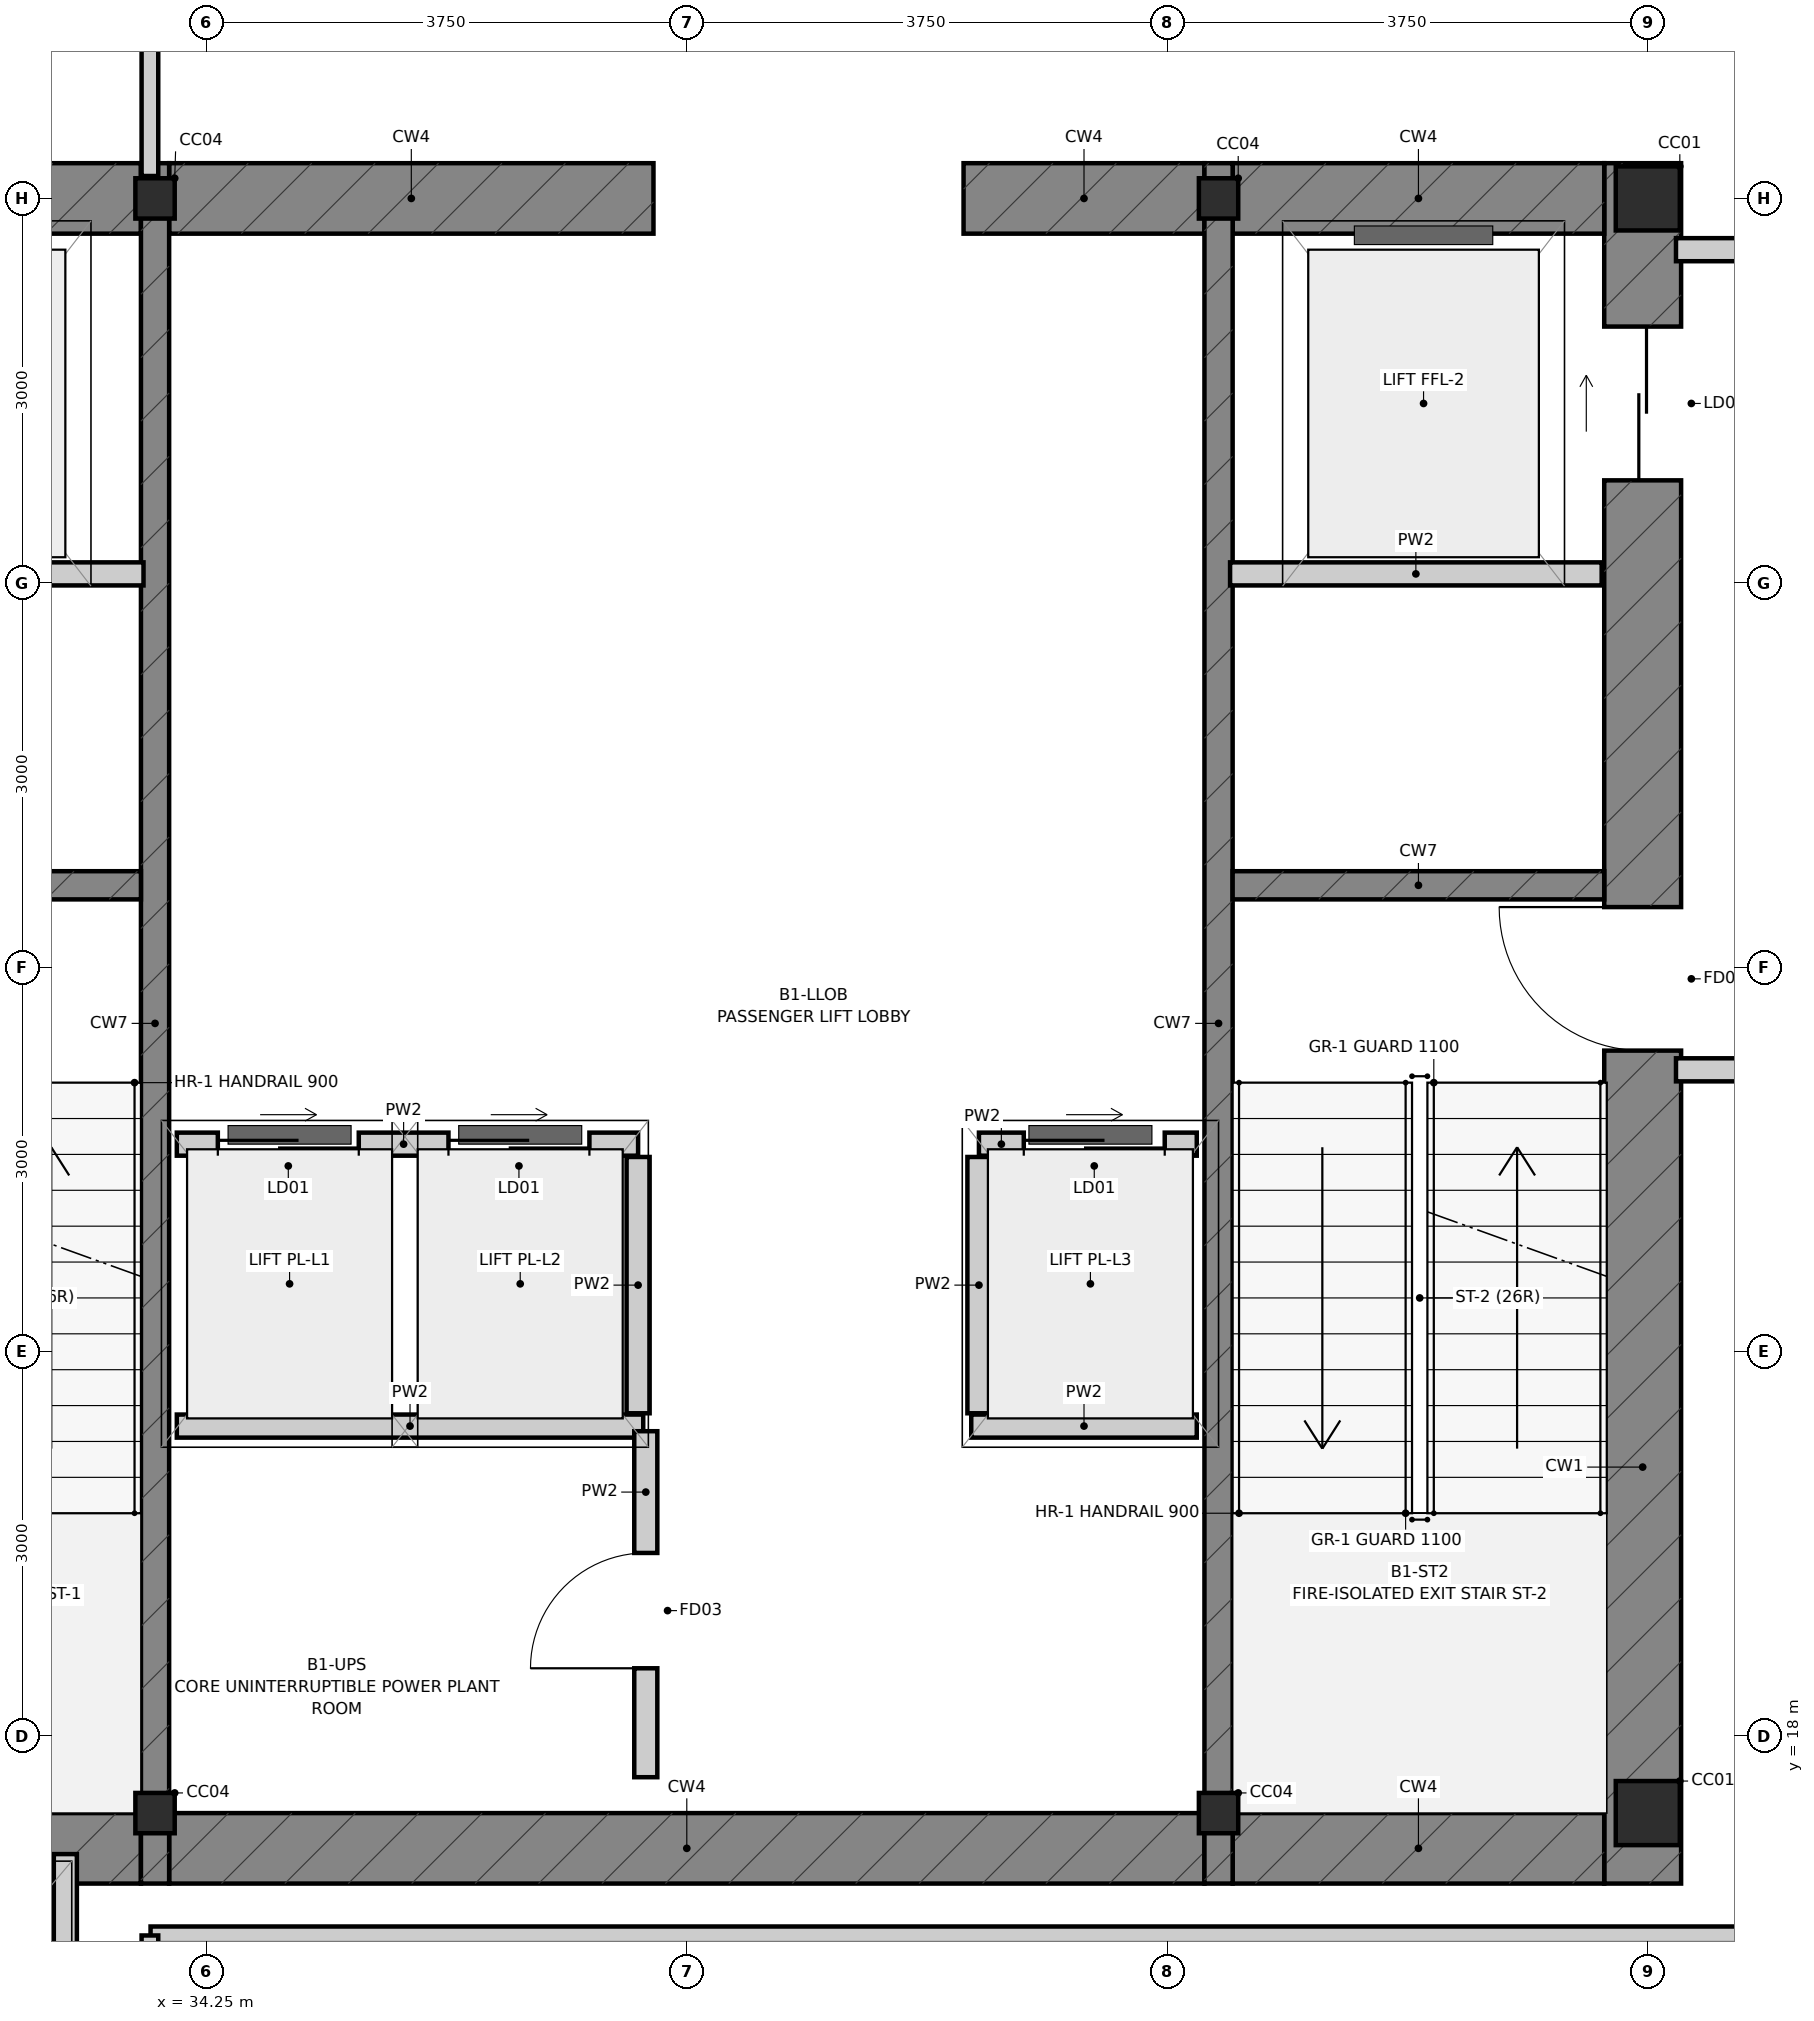
"""IFC4 building model, lengths in metres.
Left out: names, types, materials, properties, quantities, classifications, styles, units other than length and angle.
Written with IfcOpenShell. Run it as: python <this file> out.ifc"""

import sys

from ifc_helpers import new_model, si_unit, direction, frame, frame_2d, origin, origin_2d, place, context, subcontext, project, spatial, rectangle, i_section, extrude, source, transform, mapped, element, fill, save


model = new_model("IFC4")
c1 = context("Model", 3, precision=1e-05, world=origin(), true_north=direction((0.0, 1.0)))
c2 = subcontext(c1, "Body", "Model", "MODEL_VIEW")
j1 = project(units=[si_unit("LENGTHUNIT", "METRE"), si_unit("PLANEANGLEUNIT", "RADIAN")], contexts=[c1])
p1 = place(None, origin())
s1 = spatial("IfcSite", under=j1, at=p1, CompositionType="ELEMENT")
p2 = place(p1, origin())
s2 = spatial("IfcBuilding", under=s1, at=p2, CompositionType="ELEMENT")
p3 = place(p2, frame((0.0, 0.0, -4.8)))
s3 = spatial("IfcBuildingStorey", under=s2, at=p3, CompositionType="ELEMENT", Elevation=-4.8)
m1 = source(origin(), c2, "Body", "SweptSolid", [
    extrude(i_section(OverallWidth=0.5, OverallDepth=0.5, WebThickness=0.028, FlangeThickness=0.04, at=origin_2d()), origin(), (0.0, 0.0, 1.0), 4.8),
])
for number, where, z_axis, x_axis in (
    (1, (45.5, 17.4, 0.0), (0.0, 0.0, 1.0), (1.0, 0.0, 0.0)),
    (2, (45.5, 30.0, 0.0), (0.0, 0.0, 1.0), (1.0, 0.0, 0.0)),
):
    element("IfcColumn", number, at=place(p3, frame(where, z_axis=z_axis, x_axis=x_axis)), inside=s3, PredefinedType="COLUMN", context=c2, shape_type="MappedRepresentation", body=[
        mapped(m1, transform((0.0, 0.0, 0.0), scale=1.0)),
    ])
m2 = source(origin(), c2, "Body", "SweptSolid", [
    extrude(i_section(OverallWidth=0.307, OverallDepth=0.315, WebThickness=0.012, FlangeThickness=0.019, at=origin_2d()), origin(), (0.0, 0.0, 1.0), 4.8),
])
for number, where, z_axis, x_axis in (
    (3, (33.85, 17.4, 0.0), (0.0, 0.0, 1.0), (1.0, 0.0, 0.0)),
    (4, (42.15, 17.4, 0.0), (0.0, 0.0, 1.0), (1.0, 0.0, 0.0)),
    (5, (33.85, 30.0, 0.0), (0.0, 0.0, 1.0), (1.0, 0.0, 0.0)),
    (6, (42.15, 30.0, 0.0), (0.0, 0.0, 1.0), (1.0, 0.0, 0.0)),
):
    element("IfcColumn", number, at=place(p3, frame(where, z_axis=z_axis, x_axis=x_axis)), inside=s3, PredefinedType="COLUMN", context=c2, shape_type="MappedRepresentation", body=[
        mapped(m2, transform((0.0, 0.0, 0.0), scale=1.0)),
    ])
p4 = place(p3, frame((45.46, 16.85, 0.0), z_axis=(0.0, 0.0, 1.0), x_axis=(0.0, 1.0, 0.0)))
e7 = element("IfcWall", 7, at=p4, inside=s3, PredefinedType="SHEAR", context=c2, shape_type="SweptSolid", body=[
    extrude(rectangle(XDim=13.425, YDim=0.6, at=frame_2d((6.712, 0.0))), origin(), (0.0, 0.0, 1.0), 4.8),
])
p5 = place(p4, frame((6.5, 0.0, 0.0)))
e8 = element("IfcOpeningElement", 8, at=p5, cuts=e7, PredefinedType="OPENING", context=c2, shape_type="SweptSolid", body=[
    extrude(rectangle(XDim=1.12, YDim=2.15, at=frame_2d((0.56, 1.075))), frame((0.0, 0.312, 0.0), z_axis=(0.0, -1.0, 0.0), x_axis=(1.0, 0.0, 0.0)), (0.0, 0.0, 1.0), 0.624),
])
p6 = place(p4, frame((10.95, 0.0, 0.0)))
e9 = element("IfcOpeningElement", 9, at=p6, cuts=e7, PredefinedType="OPENING", context=c2, shape_type="SweptSolid", body=[
    extrude(rectangle(XDim=1.2, YDim=2.2, at=frame_2d((0.6, 1.1))), frame((0.0, 0.312, 0.0), z_axis=(0.0, -1.0, 0.0), x_axis=(1.0, 0.0, 0.0)), (0.0, 0.0, 1.0), 0.624),
])
p7 = place(p3, frame((30.84, 17.125, 0.0), z_axis=(0.0, 0.0, 1.0), x_axis=(1.0, 0.0, 0.0)))
e10 = element("IfcWall", 10, at=p7, inside=s3, PredefinedType="SHEAR", context=c2, shape_type="SweptSolid", body=[
    extrude(rectangle(XDim=2.9, YDim=0.55, at=frame_2d((1.45, 0.0))), origin(), (0.0, 0.0, 1.0), 4.8),
])
p8 = place(p3, frame((33.96, 17.125, 0.0), z_axis=(0.0, 0.0, 1.0), x_axis=(1.0, 0.0, 0.0)))
e11 = element("IfcWall", 11, at=p8, inside=s3, PredefinedType="SHEAR", context=c2, shape_type="SweptSolid", body=[
    extrude(rectangle(XDim=8.08, YDim=0.55, at=frame_2d((4.04, 0.0))), origin(), (0.0, 0.0, 1.0), 4.8),
])
for number, where, z_axis, x_axis in (
    (12, (42.26, 17.125, 0.0), (0.0, 0.0, 1.0), (1.0, 0.0, 0.0)),
    (13, (30.84, 30.0, 0.0), (0.0, 0.0, 1.0), (1.0, 0.0, 0.0)),
):
    element("IfcWall", number, at=place(p3, frame(where, z_axis=z_axis, x_axis=x_axis)), inside=s3, PredefinedType="SHEAR", context=c2, shape_type="SweptSolid", body=[
        extrude(rectangle(XDim=2.9, YDim=0.55, at=frame_2d((1.45, 0.0))), origin(), (0.0, 0.0, 1.0), 4.8),
    ])
p9 = place(p3, frame((33.96, 30.0, 0.0), z_axis=(0.0, 0.0, 1.0), x_axis=(1.0, 0.0, 0.0)))
e14 = element("IfcWall", 14, at=p9, inside=s3, PredefinedType="SHEAR", context=c2, shape_type="SweptSolid", body=[
    extrude(rectangle(XDim=3.78, YDim=0.55, at=frame_2d((1.89, 0.0))), origin(), (0.0, 0.0, 1.0), 4.8),
])
p10 = place(p3, frame((40.16, 30.0, 0.0), z_axis=(0.0, 0.0, 1.0), x_axis=(1.0, 0.0, 0.0)))
e15 = element("IfcWall", 15, at=p10, inside=s3, PredefinedType="SHEAR", context=c2, shape_type="SweptSolid", body=[
    extrude(rectangle(XDim=1.88, YDim=0.55, at=frame_2d((0.94, 0.0))), origin(), (0.0, 0.0, 1.0), 4.8),
])
p11 = place(p3, frame((42.26, 30.0, 0.0), z_axis=(0.0, 0.0, 1.0), x_axis=(1.0, 0.0, 0.0)))
e16 = element("IfcWall", 16, at=p11, inside=s3, PredefinedType="SHEAR", context=c2, shape_type="SweptSolid", body=[
    extrude(rectangle(XDim=2.9, YDim=0.55, at=frame_2d((1.45, 0.0))), origin(), (0.0, 0.0, 1.0), 4.8),
])
for number, where, z_axis, x_axis in (
    (17, (33.85, 16.85, 0.0), (0.0, 0.0, 1.0), (0.0, 1.0, 0.0)),
    (18, (42.15, 16.85, 0.0), (0.0, 0.0, 1.0), (0.0, 1.0, 0.0)),
):
    element("IfcWall", number, at=place(p3, frame(where, z_axis=z_axis, x_axis=x_axis)), inside=s3, PredefinedType="SHEAR", context=c2, shape_type="SweptSolid", body=[
        extrude(rectangle(XDim=13.425, YDim=0.22, at=frame_2d((6.712, 0.0))), origin(), (0.0, 0.0, 1.0), 4.8),
    ])
for number, where, z_axis, x_axis in (
    (19, (30.84, 24.64, 0.0), (0.0, 0.0, 1.0), (1.0, 0.0, 0.0)),
    (20, (42.26, 24.64, 0.0), (0.0, 0.0, 1.0), (1.0, 0.0, 0.0)),
):
    element("IfcWall", number, at=place(p3, frame(where, z_axis=z_axis, x_axis=x_axis)), inside=s3, PredefinedType="SHEAR", context=c2, shape_type="SweptSolid", body=[
        extrude(rectangle(XDim=2.9, YDim=0.22, at=frame_2d((1.45, 0.0))), origin(), (0.0, 0.0, 1.0), 4.8),
    ])
p12 = place(p3, frame((33.15, 14.42, 0.0), z_axis=(0.0, 0.0, 1.0), x_axis=(0.0, 1.0, 0.0)))
e21 = element("IfcWall", 21, at=p12, inside=s3, PredefinedType="PARTITIONING", context=c2, shape_type="SweptSolid", body=[
    extrude(rectangle(XDim=2.66, YDim=0.18, at=frame_2d((1.33, 0.0))), origin(), (0.0, 0.0, 1.0), 4.48),
])
p13 = place(p3, frame((34.02, 22.62, 0.0), z_axis=(0.0, 0.0, 1.0), x_axis=(1.0, 0.0, 0.0)))
e22 = element("IfcWall", 22, at=p13, inside=s3, PredefinedType="PARTITIONING", context=c2, shape_type="SweptSolid", body=[
    extrude(rectangle(XDim=3.6, YDim=0.18, at=frame_2d((1.8, 0.0))), origin(), (0.0, 0.0, 1.0), 4.48),
])
p14 = place(p13, frame((0.32, 0.0, 0.0)))
e23 = element("IfcOpeningElement", 23, at=p14, cuts=e22, PredefinedType="OPENING", context=c2, shape_type="SweptSolid", body=[
    extrude(rectangle(XDim=1.1, YDim=2.2, at=frame_2d((0.55, 1.1))), frame((0.0, 0.102, 0.0), z_axis=(0.0, -1.0, 0.0), x_axis=(1.0, 0.0, 0.0)), (0.0, 0.0, 1.0), 0.204),
])
p15 = place(p13, frame((2.12, 0.0, 0.0)))
e24 = element("IfcOpeningElement", 24, at=p15, cuts=e22, PredefinedType="OPENING", context=c2, shape_type="SweptSolid", body=[
    extrude(rectangle(XDim=1.1, YDim=2.2, at=frame_2d((0.55, 1.1))), frame((0.0, 0.102, 0.0), z_axis=(0.0, -1.0, 0.0), x_axis=(1.0, 0.0, 0.0)), (0.0, 0.0, 1.0), 0.204),
])
p16 = place(p3, frame((40.28, 22.62, 0.0), z_axis=(0.0, 0.0, 1.0), x_axis=(1.0, 0.0, 0.0)))
e25 = element("IfcWall", 25, at=p16, inside=s3, PredefinedType="PARTITIONING", context=c2, shape_type="SweptSolid", body=[
    extrude(rectangle(XDim=1.7, YDim=0.18, at=frame_2d((0.85, 0.0))), origin(), (0.0, 0.0, 1.0), 4.48),
])
p17 = place(p16, frame((0.35, 0.0, 0.0)))
e26 = element("IfcOpeningElement", 26, at=p17, cuts=e25, PredefinedType="OPENING", context=c2, shape_type="SweptSolid", body=[
    extrude(rectangle(XDim=1.1, YDim=2.2, at=frame_2d((0.55, 1.1))), frame((0.0, 0.102, 0.0), z_axis=(0.0, -1.0, 0.0), x_axis=(1.0, 0.0, 0.0)), (0.0, 0.0, 1.0), 0.204),
])
for number, where, z_axis, x_axis in (
    (27, (37.62, 20.52, 0.0), (0.0, 0.0, 1.0), (0.0, 1.0, 0.0)),
    (28, (40.28, 20.52, 0.0), (0.0, 0.0, 1.0), (0.0, 1.0, 0.0)),
):
    element("IfcWall", number, at=place(p3, frame(where, z_axis=z_axis, x_axis=x_axis)), inside=s3, PredefinedType="PARTITIONING", context=c2, shape_type="SweptSolid", body=[
        extrude(rectangle(XDim=2.0, YDim=0.18, at=frame_2d((1.0, 0.0))), origin(), (0.0, 0.0, 1.0), 4.48),
    ])
p18 = place(p3, frame((45.72, 23.2, 0.0), z_axis=(0.0, 0.0, 1.0), x_axis=(1.0, 0.0, 0.0)))
e29 = element("IfcWall", 29, at=p18, inside=s3, PredefinedType="PARTITIONING", context=c2, shape_type="SweptSolid", body=[
    extrude(rectangle(XDim=2.76, YDim=0.18, at=frame_2d((1.38, 0.0))), origin(), (0.0, 0.0, 1.0), 4.48),
])
p19 = place(p3, frame((45.72, 29.6, 0.0), z_axis=(0.0, 0.0, 1.0), x_axis=(1.0, 0.0, 0.0)))
e30 = element("IfcWall", 30, at=p19, inside=s3, PredefinedType="PARTITIONING", context=c2, shape_type="SweptSolid", body=[
    extrude(rectangle(XDim=2.76, YDim=0.18, at=frame_2d((1.38, 0.0))), origin(), (0.0, 0.0, 1.0), 3.854),
])
for number, where, z_axis, x_axis in (
    (31, (30.86, 27.07, 0.0), (0.0, 0.0, 1.0), (1.0, 0.0, 0.0)),
    (32, (42.24, 27.07, 0.0), (0.0, 0.0, 1.0), (1.0, 0.0, 0.0)),
):
    element("IfcWall", number, at=place(p3, frame(where, z_axis=z_axis, x_axis=x_axis)), inside=s3, PredefinedType="PARTITIONING", context=c2, shape_type="SweptSolid", body=[
        extrude(rectangle(XDim=2.9, YDim=0.18, at=frame_2d((1.45, 0.0))), origin(), (0.0, 0.0, 1.0), 4.48),
    ])
p20 = place(p3, frame((34.02, 20.42, 0.0), z_axis=(0.0, 0.0, 1.0), x_axis=(1.0, 0.0, 0.0)))
e33 = element("IfcWall", 33, at=p20, inside=s3, PredefinedType="PARTITIONING", context=c2, shape_type="SweptSolid", body=[
    extrude(rectangle(XDim=3.64, YDim=0.18, at=frame_2d((1.82, 0.0))), origin(), (0.0, 0.0, 1.0), 4.48),
])
p21 = place(p3, frame((40.22, 20.42, 0.0), z_axis=(0.0, 0.0, 1.0), x_axis=(1.0, 0.0, 0.0)))
e34 = element("IfcWall", 34, at=p21, inside=s3, PredefinedType="PARTITIONING", context=c2, shape_type="SweptSolid", body=[
    extrude(rectangle(XDim=1.76, YDim=0.18, at=frame_2d((0.88, 0.0))), origin(), (0.0, 0.0, 1.0), 4.48),
])
p22 = place(p3, frame((37.68, 17.68, 0.0), z_axis=(0.0, 0.0, 1.0), x_axis=(0.0, 1.0, 0.0)))
e35 = element("IfcWall", 35, at=p22, inside=s3, PredefinedType="PARTITIONING", context=c2, shape_type="SweptSolid", body=[
    extrude(rectangle(XDim=2.7, YDim=0.18, at=frame_2d((1.35, 0.0))), origin(), (0.0, 0.0, 1.0), 4.48),
])
p23 = place(p22, frame((0.85, 0.0, 0.0)))
e36 = element("IfcOpeningElement", 36, at=p23, cuts=e35, PredefinedType="OPENING", context=c2, shape_type="SweptSolid", body=[
    extrude(rectangle(XDim=0.9, YDim=2.1, at=frame_2d((0.45, 1.05))), frame((0.0, 0.102, 0.0), z_axis=(0.0, -1.0, 0.0), x_axis=(1.0, 0.0, 0.0)), (0.0, 0.0, 1.0), 0.204),
])
p24 = place(p3, frame((48.58, 16.45, 0.0), z_axis=(0.0, 0.0, 1.0), x_axis=(-1.0, 0.0, 0.0)))
e37 = element("IfcWall", 37, at=p24, inside=s3, PredefinedType="PARTITIONING", context=c2, shape_type="SweptSolid", body=[
    extrude(rectangle(XDim=14.765, YDim=0.13, at=frame_2d((7.383, 0.0))), origin(), (0.0, 0.0, 1.0), 4.48),
])
p25 = place(p3, frame((33.81, 16.445, 0.0), z_axis=(0.0, 0.0, 1.0), x_axis=(0.0, -1.0, 0.0)))
e38 = element("IfcWall", 38, at=p25, inside=s3, PredefinedType="PARTITIONING", context=c2, shape_type="SweptSolid", body=[
    extrude(rectangle(XDim=2.19, YDim=0.13, at=frame_2d((1.095, 0.0))), origin(), (0.0, 0.0, 1.0), 4.48),
])
p26 = place(p3, frame((33.81, 32.295, 0.0), z_axis=(0.0, 0.0, 1.0), x_axis=(0.0, -1.0, 0.0)))
e39 = element("IfcWall", 39, at=p26, inside=s3, PredefinedType="PARTITIONING", context=c2, shape_type="SweptSolid", body=[
    extrude(rectangle(XDim=2.12, YDim=0.13, at=frame_2d((1.06, 0.0))), origin(), (0.0, 0.0, 1.0), 4.48),
])
p27 = place(p5, origin())
e40 = element("IfcDoor", 40, at=p27, inside=s3, OperationType="SINGLE_SWING_RIGHT", PredefinedType="DOOR", context=c2, shape_type="SweptSolid", body=[
    extrude(rectangle(XDim=1.12, YDim=2.15, at=frame_2d((0.56, 1.075))), frame((0.0, 0.025, 0.0), z_axis=(0.0, -1.0, 0.0), x_axis=(1.0, 0.0, 0.0)), (0.0, 0.0, 1.0), 0.05),
])
fill(e8, e40)
p28 = place(p6, origin())
e41 = element("IfcDoor", 41, at=p28, inside=s3, OperationType="SLIDING_TO_RIGHT", PredefinedType="DOOR", context=c2, shape_type="SweptSolid", body=[
    extrude(rectangle(XDim=1.2, YDim=2.2, at=frame_2d((0.6, 1.1))), frame((0.0, 0.025, 0.0), z_axis=(0.0, -1.0, 0.0), x_axis=(1.0, 0.0, 0.0)), (0.0, 0.0, 1.0), 0.05),
])
fill(e9, e41)
p29 = place(p14, origin())
e42 = element("IfcDoor", 42, at=p29, inside=s3, OperationType="SLIDING_TO_LEFT", PredefinedType="DOOR", context=c2, shape_type="SweptSolid", body=[
    extrude(rectangle(XDim=1.1, YDim=2.2, at=frame_2d((0.55, 1.1))), frame((0.0, 0.025, 0.0), z_axis=(0.0, -1.0, 0.0), x_axis=(1.0, 0.0, 0.0)), (0.0, 0.0, 1.0), 0.05),
])
fill(e23, e42)
p30 = place(p15, origin())
e43 = element("IfcDoor", 43, at=p30, inside=s3, OperationType="SLIDING_TO_RIGHT", PredefinedType="DOOR", context=c2, shape_type="SweptSolid", body=[
    extrude(rectangle(XDim=1.1, YDim=2.2, at=frame_2d((0.55, 1.1))), frame((0.0, 0.025, 0.0), z_axis=(0.0, -1.0, 0.0), x_axis=(1.0, 0.0, 0.0)), (0.0, 0.0, 1.0), 0.05),
])
fill(e24, e43)
p31 = place(p17, origin())
e44 = element("IfcDoor", 44, at=p31, inside=s3, OperationType="SLIDING_TO_LEFT", PredefinedType="DOOR", context=c2, shape_type="SweptSolid", body=[
    extrude(rectangle(XDim=1.1, YDim=2.2, at=frame_2d((0.55, 1.1))), frame((0.0, 0.025, 0.0), z_axis=(0.0, -1.0, 0.0), x_axis=(1.0, 0.0, 0.0)), (0.0, 0.0, 1.0), 0.05),
])
fill(e26, e44)
p32 = place(p23, origin())
e45 = element("IfcDoor", 45, at=p32, inside=s3, OperationType="SINGLE_SWING_LEFT", PredefinedType="DOOR", context=c2, shape_type="SweptSolid", body=[
    extrude(rectangle(XDim=0.9, YDim=2.1, at=frame_2d((0.45, 1.05))), frame((0.0, 0.025, 0.0), z_axis=(0.0, -1.0, 0.0), x_axis=(1.0, 0.0, 0.0)), (0.0, 0.0, 1.0), 0.05),
])
fill(e36, e45)
save(model, sys.argv[1])
